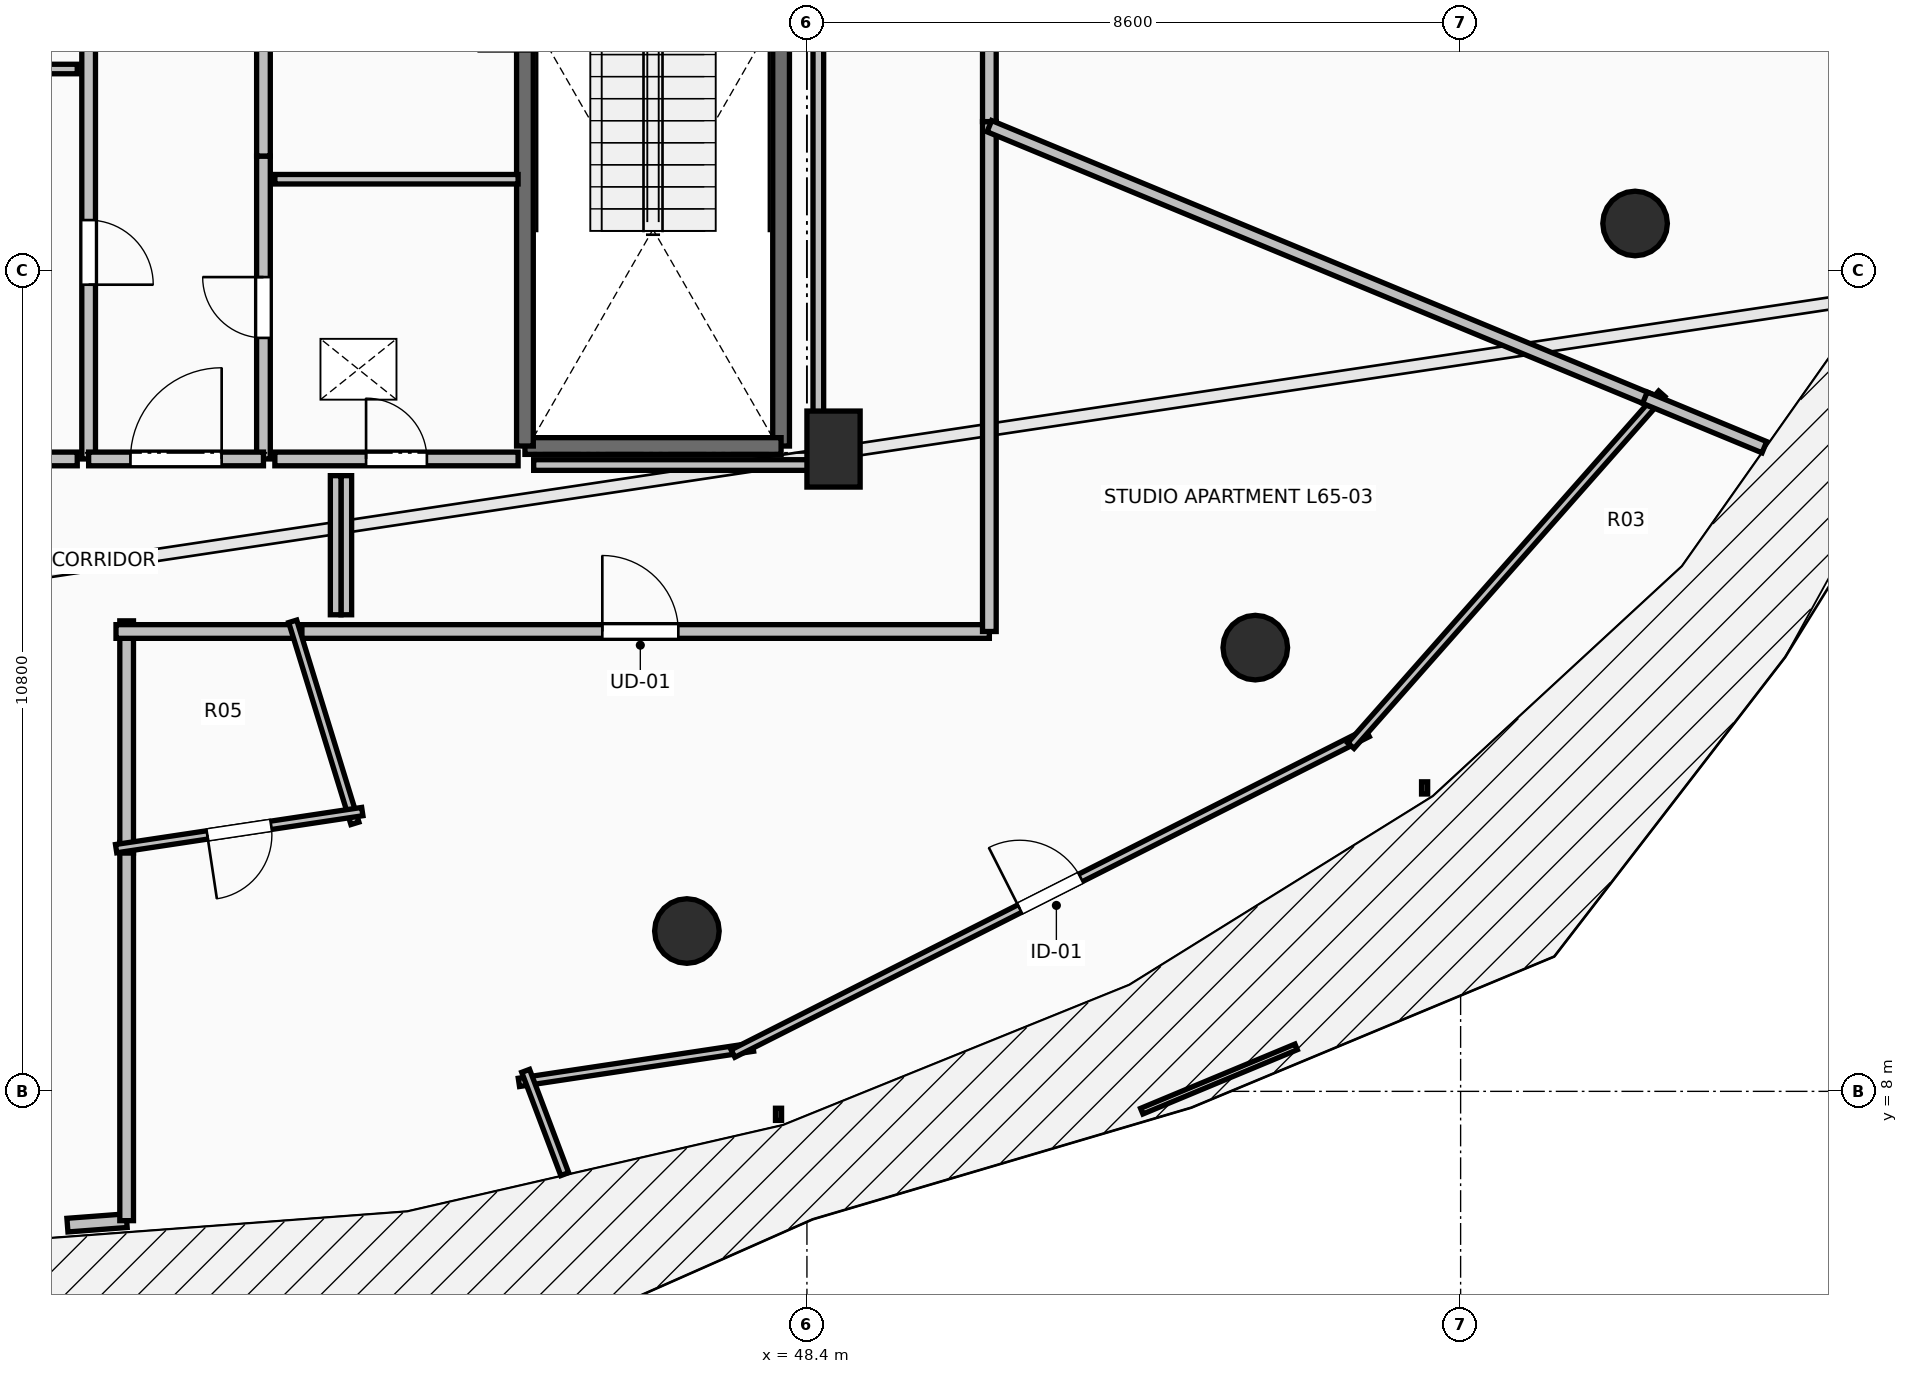
"""IFC4 building model, lengths in metres.
Left out: names, types, materials, properties, quantities, classifications, styles, units other than length and angle.
Written with IfcOpenShell. Run it as: python <this file> out.ifc"""

import sys

from ifc_helpers import new_model, si_unit, direction, frame, frame_2d, origin, origin_2d, place, context, subcontext, project, spatial, rectangle, circle, extrude, element, fill, save


model = new_model("IFC4")
c1 = context("Model", 3, precision=1e-05, world=origin(), true_north=direction((0.0, 1.0)))
c2 = subcontext(c1, "Body", "Model", "MODEL_VIEW")
j1 = project(units=[si_unit("LENGTHUNIT", "METRE"), si_unit("PLANEANGLEUNIT", "RADIAN")], contexts=[c1])
p1 = place(None, origin())
s1 = spatial("IfcSite", under=j1, at=p1, CompositionType="ELEMENT")
p2 = place(p1, origin())
s2 = spatial("IfcBuilding", under=s1, at=p2, CompositionType="ELEMENT")
p3 = place(p2, frame((0.0, 0.0, 241.35)))
s3 = spatial("IfcBuildingStorey", under=s2, at=p3, CompositionType="ELEMENT", Elevation=241.35)
for number, where, z_axis, x_axis in (
    (1, (46.821, 10.109, 0.0), (0.0, 0.0, 1.0), (0.383, -0.924, 0.0)),
    (2, (54.299, 13.838, 0.0), (0.0, 0.0, 1.0), (0.707, -0.707, 0.0)),
    (3, (59.295, 19.418, 0.0), (0.0, 0.0, 1.0), (0.924, -0.383, 0.0)),
):
    element("IfcColumn", number, at=place(p3, frame(where, z_axis=z_axis, x_axis=x_axis)), inside=s3, PredefinedType="COLUMN", context=c2, shape_type="SweptSolid", body=[
        extrude(circle(Radius=0.425, at=origin_2d()), origin(), (0.0, 0.0, 1.0), 3.55),
    ])
p4 = place(p3, frame((48.75, 16.45, 0.0), z_axis=(0.0, 0.0, 1.0), x_axis=(1.0, 0.0, 0.0)))
e4 = element("IfcColumn", 4, at=p4, inside=s3, PredefinedType="PILASTER", context=c2, shape_type="SweptSolid", body=[
    extrude(rectangle(XDim=0.7, YDim=1.0, at=origin_2d()), origin(), (0.0, 0.0, 1.0), 3.55),
])
p5 = place(p3, frame((48.06, 23.91, 0.0), z_axis=(0.0, 0.0, 1.0), x_axis=(0.0, -1.0, 0.0)))
e5 = element("IfcWall", 5, at=p5, inside=s3, PredefinedType="SOLIDWALL", context=c2, shape_type="SweptSolid", body=[
    extrude(rectangle(XDim=7.42, YDim=0.22, at=frame_2d((3.71, 0.0))), origin(), (0.0, 0.0, 1.0), 3.29),
])
p6 = place(p3, frame((48.06, 16.49, 0.0), z_axis=(0.0, 0.0, 1.0), x_axis=(-1.0, 0.0, 0.0)))
e6 = element("IfcWall", 6, at=p6, inside=s3, PredefinedType="SOLIDWALL", context=c2, shape_type="SweptSolid", body=[
    extrude(rectangle(XDim=3.37, YDim=0.22, at=frame_2d((1.685, 0.0))), origin(), (0.0, 0.0, 1.0), 3.29),
])
p7 = place(p3, frame((44.69, 16.49, 0.0), z_axis=(0.0, 0.0, 1.0), x_axis=(0.0, 1.0, 0.0)))
e7 = element("IfcWall", 7, at=p7, inside=s3, PredefinedType="SOLIDWALL", context=c2, shape_type="SweptSolid", body=[
    extrude(rectangle(XDim=7.42, YDim=0.22, at=frame_2d((3.71, 0.0))), origin(), (0.0, 0.0, 1.0), 3.29),
])
p8 = place(p3, frame((41.25, 16.32, 0.0), z_axis=(0.0, 0.0, 1.0), x_axis=(0.0, 1.0, 0.0)))
e8 = element("IfcWall", 8, at=p8, inside=s3, PredefinedType="PARTITIONING", context=c2, shape_type="SweptSolid", body=[
    extrude(rectangle(XDim=3.985, YDim=0.18, at=frame_2d((1.992, 0.0))), origin(), (0.0, 0.0, 1.0), 3.29),
])
p9 = place(p8, frame((1.593, 0.0, 0.0)))
e9 = element("IfcOpeningElement", 9, at=p9, cuts=e8, PredefinedType="OPENING", context=c2, shape_type="SweptSolid", body=[
    extrude(rectangle(XDim=0.8, YDim=2.05, at=frame_2d((0.4, 1.025))), frame((0.0, 0.105, 0.0), z_axis=(0.0, -1.0, 0.0), x_axis=(1.0, 0.0, 0.0)), (0.0, 0.0, 1.0), 0.21),
])
p10 = place(p3, frame((41.25, 20.305, 0.0), z_axis=(0.0, 0.0, 1.0), x_axis=(0.0, 1.0, 0.0)))
e10 = element("IfcWall", 10, at=p10, inside=s3, PredefinedType="PARTITIONING", context=c2, shape_type="SweptSolid", body=[
    extrude(rectangle(XDim=3.895, YDim=0.18, at=frame_2d((1.948, 0.0))), origin(), (0.0, 0.0, 1.0), 2.482),
])
p11 = place(p10, frame((1.522, 0.0, 0.0)))
e11 = element("IfcOpeningElement", 11, at=p11, cuts=e10, PredefinedType="OPENING", context=c2, shape_type="SweptSolid", body=[
    extrude(rectangle(XDim=0.85, YDim=2.1, at=frame_2d((0.425, 1.05))), frame((0.0, 0.105, 0.0), z_axis=(0.0, -1.0, 0.0), x_axis=(1.0, 0.0, 0.0)), (0.0, 0.0, 1.0), 0.21),
])
p12 = place(p3, frame((38.95, 21.755, 0.0), z_axis=(0.0, 0.0, 1.0), x_axis=(0.0, -1.0, 0.0)))
e12 = element("IfcWall", 12, at=p12, inside=s3, PredefinedType="PARTITIONING", context=c2, shape_type="SweptSolid", body=[
    extrude(rectangle(XDim=5.435, YDim=0.18, at=frame_2d((2.717, 0.0))), origin(), (0.0, 0.0, 1.0), 3.29),
])
p13 = place(p12, frame((2.292, 0.0, 0.0)))
e13 = element("IfcOpeningElement", 13, at=p13, cuts=e12, PredefinedType="OPENING", context=c2, shape_type="SweptSolid", body=[
    extrude(rectangle(XDim=0.85, YDim=2.1, at=frame_2d((0.425, 1.05))), frame((0.0, 0.105, 0.0), z_axis=(0.0, -1.0, 0.0), x_axis=(1.0, 0.0, 0.0)), (0.0, 0.0, 1.0), 0.21),
])
p14 = place(p3, frame((38.95, 16.32, 0.0), z_axis=(0.0, 0.0, 1.0), x_axis=(1.0, 0.0, 0.0)))
e14 = element("IfcWall", 14, at=p14, inside=s3, PredefinedType="PARTITIONING", context=c2, shape_type="SweptSolid", body=[
    extrude(rectangle(XDim=2.3, YDim=0.18, at=frame_2d((1.15, 0.0))), origin(), (0.0, 0.0, 1.0), 3.29),
])
p15 = place(p14, frame((0.55, 0.0, 0.0)))
e15 = element("IfcOpeningElement", 15, at=p15, cuts=e14, PredefinedType="OPENING", context=c2, shape_type="SweptSolid", body=[
    extrude(rectangle(XDim=1.2, YDim=2.15, at=frame_2d((0.6, 1.075))), frame((0.0, 0.105, 0.0), z_axis=(0.0, -1.0, 0.0), x_axis=(1.0, 0.0, 0.0)), (0.0, 0.0, 1.0), 0.21),
])
p16 = place(p3, frame((44.6, 20.0, 0.0), z_axis=(0.0, 0.0, 1.0), x_axis=(-1.0, 0.0, 0.0)))
e16 = element("IfcWall", 16, at=p16, inside=s3, PredefinedType="PARTITIONING", context=c2, shape_type="SweptSolid", body=[
    extrude(rectangle(XDim=3.2, YDim=0.125, at=frame_2d((1.6, 0.0))), origin(), (0.0, 0.0, 1.0), 3.29),
])
p17 = place(p3, frame((41.4, 16.32, 0.0), z_axis=(0.0, 0.0, 1.0), x_axis=(1.0, 0.0, 0.0)))
e17 = element("IfcWall", 17, at=p17, inside=s3, PredefinedType="PARTITIONING", context=c2, shape_type="SweptSolid", body=[
    extrude(rectangle(XDim=3.2, YDim=0.18, at=frame_2d((1.6, 0.0))), origin(), (0.0, 0.0, 1.0), 3.29),
])
p18 = place(p17, frame((1.2, 0.0, 0.0)))
e18 = element("IfcOpeningElement", 18, at=p18, cuts=e17, PredefinedType="OPENING", context=c2, shape_type="SweptSolid", body=[
    extrude(rectangle(XDim=0.8, YDim=2.05, at=frame_2d((0.4, 1.025))), frame((0.0, 0.105, 0.0), z_axis=(0.0, -1.0, 0.0), x_axis=(1.0, 0.0, 0.0)), (0.0, 0.0, 1.0), 0.21),
])
p19 = place(p3, frame((38.8, 21.45, 0.0), z_axis=(0.0, 0.0, 1.0), x_axis=(-1.0, 0.0, 0.0)))
e19 = element("IfcWall", 19, at=p19, inside=s3, PredefinedType="PARTITIONING", context=c2, shape_type="SweptSolid", body=[
    extrude(rectangle(XDim=2.955, YDim=0.125, at=frame_2d((1.478, 0.0))), origin(), (0.0, 0.0, 1.0), 3.29),
])
p20 = place(p3, frame((31.4, 16.32, 0.0), z_axis=(0.0, 0.0, 1.0), x_axis=(1.0, 0.0, 0.0)))
e20 = element("IfcWall", 20, at=p20, inside=s3, PredefinedType="PARTITIONING", context=c2, shape_type="SweptSolid", body=[
    extrude(rectangle(XDim=7.4, YDim=0.18, at=frame_2d((3.7, 0.0))), origin(), (0.0, 0.0, 1.0), 3.29),
])
p21 = place(p20, frame((3.275, 0.0, 0.0)))
e21 = element("IfcOpeningElement", 21, at=p21, cuts=e20, PredefinedType="OPENING", context=c2, shape_type="SweptSolid", body=[
    extrude(rectangle(XDim=0.85, YDim=2.1, at=frame_2d((0.425, 1.05))), frame((0.0, 0.105, 0.0), z_axis=(0.0, -1.0, 0.0), x_axis=(1.0, 0.0, 0.0)), (0.0, 0.0, 1.0), 0.21),
])
p22 = place(p3, frame((38.671, 6.24, 0.0), z_axis=(0.0, 0.0, 1.0), x_axis=(0.997136622012, 0.0756211415, 0.0)))
e22 = element("IfcWall", 22, at=p22, inside=s3, PredefinedType="PARTITIONING", context=c2, shape_type="SweptSolid", body=[
    extrude(rectangle(XDim=0.781, YDim=0.18, at=frame_2d((0.391, 0.0))), origin(), (0.0, 0.0, 1.0), 3.29),
])
p23 = place(p3, frame((39.45, 6.299, 0.0), z_axis=(0.0, 0.0, 1.0), x_axis=(0.0, 1.0, 0.0)))
e23 = element("IfcWall", 23, at=p23, inside=s3, PredefinedType="PARTITIONING", context=c2, shape_type="SweptSolid", body=[
    extrude(rectangle(XDim=4.976, YDim=0.18, at=frame_2d((2.488, 0.0))), origin(), (0.0, 0.0, 1.0), 2.482),
])
p24 = place(p3, frame((41.616, 14.05, 0.0), z_axis=(0.0, 0.0, 1.0), x_axis=(1.0, 0.0, 0.0)))
e24 = element("IfcWall", 24, at=p24, inside=s3, PredefinedType="PARTITIONING", context=c2, shape_type="SweptSolid", body=[
    extrude(rectangle(XDim=9.184, YDim=0.18, at=frame_2d((4.592, 0.0))), origin(), (0.0, 0.0, 1.0), 2.482),
])
p25 = place(p24, frame((4.092, 0.0, 0.0)))
e25 = element("IfcOpeningElement", 25, at=p25, cuts=e24, PredefinedType="OPENING", context=c2, shape_type="SweptSolid", body=[
    extrude(rectangle(XDim=1.0, YDim=2.15, at=frame_2d((0.5, 1.075))), frame((0.0, 0.105, 0.0), z_axis=(0.0, -1.0, 0.0), x_axis=(1.0, 0.0, 0.0)), (0.0, 0.0, 1.0), 0.21),
])
p26 = place(p3, frame((50.8, 14.05, 0.0), z_axis=(0.0, 0.0, 1.0), x_axis=(0.0, 1.0, 0.0)))
e26 = element("IfcWall", 26, at=p26, inside=s3, PredefinedType="PARTITIONING", context=c2, shape_type="SweptSolid", body=[
    extrude(rectangle(XDim=6.708, YDim=0.18, at=frame_2d((3.354, 0.0))), origin(), (0.0, 0.0, 1.0), 2.482),
])
p27 = place(p3, frame((39.45, 11.135, 0.0), z_axis=(0.0, 0.0, 1.0), x_axis=(0.0, 1.0, 0.0)))
e27 = element("IfcWall", 27, at=p27, inside=s3, PredefinedType="PARTITIONING", context=c2, shape_type="SweptSolid", body=[
    extrude(rectangle(XDim=3.055, YDim=0.18, at=frame_2d((1.527, 0.0))), origin(), (0.0, 0.0, 1.0), 2.924),
])
p28 = place(p3, frame((39.31, 14.05, 0.0), z_axis=(0.0, 0.0, 1.0), x_axis=(1.0, 0.0, 0.0)))
e28 = element("IfcWall", 28, at=p28, inside=s3, PredefinedType="PARTITIONING", context=c2, shape_type="SweptSolid", body=[
    extrude(rectangle(XDim=2.446, YDim=0.18, at=frame_2d((1.223, 0.0))), origin(), (0.0, 0.0, 1.0), 2.972),
])
p29 = place(p3, frame((50.8, 20.758, 0.0), z_axis=(0.0, 0.0, 1.0), x_axis=(0.0, 1.0, 0.0)))
e29 = element("IfcWall", 29, at=p29, inside=s3, PredefinedType="PARTITIONING", context=c2, shape_type="SweptSolid", body=[
    extrude(rectangle(XDim=15.192, YDim=0.18, at=frame_2d((7.596, 0.0))), origin(), (0.0, 0.0, 1.0), 2.482),
])
p30 = place(p29, frame((7.096, 0.0, 0.0)))
e30 = element("IfcOpeningElement", 30, at=p30, cuts=e29, PredefinedType="OPENING", context=c2, shape_type="SweptSolid", body=[
    extrude(rectangle(XDim=1.0, YDim=2.15, at=frame_2d((0.5, 1.075))), frame((0.0, 0.105, 0.0), z_axis=(0.0, -1.0, 0.0), x_axis=(1.0, 0.0, 0.0)), (0.0, 0.0, 1.0), 0.21),
])
p31 = place(p3, frame((41.635, 14.184, 0.0), z_axis=(0.0, 0.0, 1.0), x_axis=(0.294283258928, -0.955718244837, 0.0)))
e31 = element("IfcWall", 31, at=p31, inside=s3, PredefinedType="PARTITIONING", context=c2, shape_type="SweptSolid", body=[
    extrude(rectangle(XDim=2.781, YDim=0.11, at=frame_2d((1.39, 0.0))), origin(), (0.0, 0.0, 1.0), 2.482),
])
p32 = place(p3, frame((42.55, 11.681, 0.0), z_axis=(0.0, 0.0, 1.0), x_axis=(-0.98884760338, -0.148930914485, 0.0)))
e32 = element("IfcWall", 32, at=p32, inside=s3, PredefinedType="PARTITIONING", context=c2, shape_type="SweptSolid", body=[
    extrude(rectangle(XDim=3.275, YDim=0.11, at=frame_2d((1.638, 0.0))), origin(), (0.0, 0.0, 1.0), 2.482),
])
p33 = place(p32, frame((1.213, 0.0, 0.0)))
e33 = element("IfcOpeningElement", 33, at=p33, cuts=e32, PredefinedType="OPENING", context=c2, shape_type="SweptSolid", body=[
    extrude(rectangle(XDim=0.85, YDim=2.1, at=frame_2d((0.425, 1.05))), frame((0.0, 0.07, 0.0), z_axis=(0.0, -1.0, 0.0), x_axis=(1.0, 0.0, 0.0)), (0.0, 0.0, 1.0), 0.14),
])
p34 = place(p3, frame((44.611, 8.118, 0.0), z_axis=(0.0, 0.0, 1.0), x_axis=(0.988858596585, 0.148857905265, 0.0)))
e34 = element("IfcWall", 34, at=p34, inside=s3, PredefinedType="PARTITIONING", context=c2, shape_type="SweptSolid", body=[
    extrude(rectangle(XDim=3.115, YDim=0.11, at=frame_2d((1.557, 0.0))), origin(), (0.0, 0.0, 1.0), 3.29),
])
p35 = place(p3, frame((47.427, 8.498, 0.0), z_axis=(0.0, 0.0, 1.0), x_axis=(0.892502876412, 0.451041700507, 0.0)))
e35 = element("IfcWall", 35, at=p35, inside=s3, PredefinedType="PARTITIONING", context=c2, shape_type="SweptSolid", body=[
    extrude(rectangle(XDim=9.352, YDim=0.11, at=frame_2d((4.676, 0.0))), origin(), (0.0, 0.0, 1.0), 3.29),
])
p36 = place(p35, frame((4.226, 0.0, 0.0)))
e36 = element("IfcOpeningElement", 36, at=p36, cuts=e35, PredefinedType="OPENING", context=c2, shape_type="SweptSolid", body=[
    extrude(rectangle(XDim=0.9, YDim=2.1, at=frame_2d((0.45, 1.05))), frame((0.0, 0.07, 0.0), z_axis=(0.0, -1.0, 0.0), x_axis=(1.0, 0.0, 0.0)), (0.0, 0.0, 1.0), 0.14),
])
p37 = place(p3, frame((55.556, 12.548, 0.0), z_axis=(0.0, 0.0, 1.0), x_axis=(0.662167862663, 0.749355537549, 0.0)))
e37 = element("IfcWall", 37, at=p37, inside=s3, PredefinedType="PARTITIONING", context=c2, shape_type="SweptSolid", body=[
    extrude(rectangle(XDim=6.177, YDim=0.11, at=frame_2d((3.089, 0.0))), origin(), (0.0, 0.0, 1.0), 3.29),
])
p38 = place(p3, frame((45.213, 6.911, 0.0), z_axis=(0.0, 0.0, 1.0), x_axis=(-0.353737146492, 0.935344872863, 0.0)))
e38 = element("IfcWall", 38, at=p38, inside=s3, PredefinedType="PARTITIONING", context=c2, shape_type="SweptSolid", body=[
    extrude(rectangle(XDim=1.453, YDim=0.11, at=frame_2d((0.727, 0.0))), origin(), (0.0, 0.0, 1.0), 3.29),
])
p39 = place(p3, frame((59.554, 17.072, 0.0), z_axis=(0.0, 0.0, 1.0), x_axis=(-0.923879910499, 0.382682519822, 0.0)))
e39 = element("IfcWall", 39, at=p39, inside=s3, PredefinedType="PARTITIONING", context=c2, shape_type="SweptSolid", body=[
    extrude(rectangle(XDim=9.475, YDim=0.16, at=frame_2d((4.738, 0.0))), origin(), (0.0, 0.0, 1.0), 2.874),
])
p40 = place(p3, frame((60.996, 16.474, 0.0), z_axis=(0.0, 0.0, 1.0), x_axis=(-0.923843638485, 0.382770076719, 0.0)))
e40 = element("IfcWall", 40, at=p40, inside=s3, PredefinedType="PARTITIONING", context=c2, shape_type="SweptSolid", body=[
    extrude(rectangle(XDim=1.701, YDim=0.16, at=frame_2d((0.851, 0.0))), origin(), (0.0, 0.0, 1.0), 3.29),
])
p41 = place(p3, frame((42.34, 14.27, 0.0), z_axis=(0.0, 0.0, 1.0), x_axis=(0.0, 1.0, 0.0)))
e41 = element("IfcWall", 41, at=p41, inside=s3, PredefinedType="PARTITIONING", context=c2, shape_type="SweptSolid", body=[
    extrude(rectangle(XDim=1.83, YDim=0.14, at=frame_2d((0.915, 0.0))), origin(), (0.0, 0.0, 1.0), 3.29),
])
p42 = place(p3, frame((44.805, 16.24, 0.0), z_axis=(0.0, 0.0, 1.0), x_axis=(1.0, 0.0, 0.0)))
e42 = element("IfcWall", 42, at=p42, inside=s3, PredefinedType="PARTITIONING", context=c2, shape_type="SweptSolid", body=[
    extrude(rectangle(XDim=3.745, YDim=0.14, at=frame_2d((1.873, 0.0))), origin(), (0.0, 0.0, 1.0), 2.482),
])
p43 = place(p3, frame((48.55, 16.24, 0.0), z_axis=(0.0, 0.0, 1.0), x_axis=(0.0, 1.0, 0.0)))
e43 = element("IfcWall", 43, at=p43, inside=s3, PredefinedType="PARTITIONING", context=c2, shape_type="SweptSolid", body=[
    extrude(rectangle(XDim=7.514, YDim=0.14, at=frame_2d((3.757, 0.0))), origin(), (0.0, 0.0, 1.0), 2.482),
])
p44 = place(p3, frame((42.2, 16.1, 0.0), z_axis=(0.0, 0.0, 1.0), x_axis=(0.0, -1.0, 0.0)))
e44 = element("IfcWall", 44, at=p44, inside=s3, PredefinedType="PARTITIONING", context=c2, shape_type="SweptSolid", body=[
    extrude(rectangle(XDim=1.83, YDim=0.14, at=frame_2d((0.915, 0.0))), origin(), (0.0, 0.0, 1.0), 3.29),
])
p45 = place(p9, origin())
e45 = element("IfcDoor", 45, at=p45, inside=s3, OperationType="SINGLE_SWING_RIGHT", PredefinedType="DOOR", context=c2, shape_type="SweptSolid", body=[
    extrude(rectangle(XDim=0.8, YDim=2.05, at=frame_2d((0.4, 1.025))), frame((0.0, 0.025, 0.0), z_axis=(0.0, -1.0, 0.0), x_axis=(1.0, 0.0, 0.0)), (0.0, 0.0, 1.0), 0.05),
])
fill(e9, e45)
p46 = place(p13, origin())
e46 = element("IfcDoor", 46, at=p46, inside=s3, OperationType="SINGLE_SWING_RIGHT", PredefinedType="DOOR", context=c2, shape_type="SweptSolid", body=[
    extrude(rectangle(XDim=0.85, YDim=2.1, at=frame_2d((0.425, 1.05))), frame((0.0, 0.025, 0.0), z_axis=(0.0, -1.0, 0.0), x_axis=(1.0, 0.0, 0.0)), (0.0, 0.0, 1.0), 0.05),
])
fill(e13, e46)
p47 = place(p15, origin())
e47 = element("IfcDoor", 47, at=p47, inside=s3, OperationType="SINGLE_SWING_RIGHT", PredefinedType="DOOR", context=c2, shape_type="SweptSolid", body=[
    extrude(rectangle(XDim=1.2, YDim=2.15, at=frame_2d((0.6, 1.075))), frame((0.0, 0.025, 0.0), z_axis=(0.0, -1.0, 0.0), x_axis=(1.0, 0.0, 0.0)), (0.0, 0.0, 1.0), 0.05),
])
fill(e15, e47)
p48 = place(p18, origin())
e48 = element("IfcDoor", 48, at=p48, inside=s3, OperationType="SINGLE_SWING_LEFT", PredefinedType="DOOR", context=c2, shape_type="SweptSolid", body=[
    extrude(rectangle(XDim=0.8, YDim=2.05, at=frame_2d((0.4, 1.025))), frame((0.0, 0.025, 0.0), z_axis=(0.0, -1.0, 0.0), x_axis=(1.0, 0.0, 0.0)), (0.0, 0.0, 1.0), 0.05),
])
fill(e18, e48)
p49 = place(p25, origin())
e49 = element("IfcDoor", 49, at=p49, inside=s3, OperationType="SINGLE_SWING_LEFT", PredefinedType="DOOR", context=c2, shape_type="SweptSolid", body=[
    extrude(rectangle(XDim=1.0, YDim=2.15, at=frame_2d((0.5, 1.075))), frame((0.0, 0.025, 0.0), z_axis=(0.0, -1.0, 0.0), x_axis=(1.0, 0.0, 0.0)), (0.0, 0.0, 1.0), 0.05),
])
fill(e25, e49)
p50 = place(p33, origin())
e50 = element("IfcDoor", 50, at=p50, inside=s3, OperationType="SINGLE_SWING_RIGHT", PredefinedType="DOOR", context=c2, shape_type="SweptSolid", body=[
    extrude(rectangle(XDim=0.85, YDim=2.1, at=frame_2d((0.425, 1.05))), frame((0.0, 0.025, 0.0), z_axis=(0.0, -1.0, 0.0), x_axis=(1.0, 0.0, 0.0)), (0.0, 0.0, 1.0), 0.05),
])
fill(e33, e50)
p51 = place(p36, origin())
e51 = element("IfcDoor", 51, at=p51, inside=s3, OperationType="SINGLE_SWING_LEFT", PredefinedType="DOOR", context=c2, shape_type="SweptSolid", body=[
    extrude(rectangle(XDim=0.9, YDim=2.1, at=frame_2d((0.45, 1.05))), frame((0.0, 0.025, 0.0), z_axis=(0.0, -1.0, 0.0), x_axis=(1.0, 0.0, 0.0)), (0.0, 0.0, 1.0), 0.05),
])
fill(e36, e51)
save(model, sys.argv[1])
